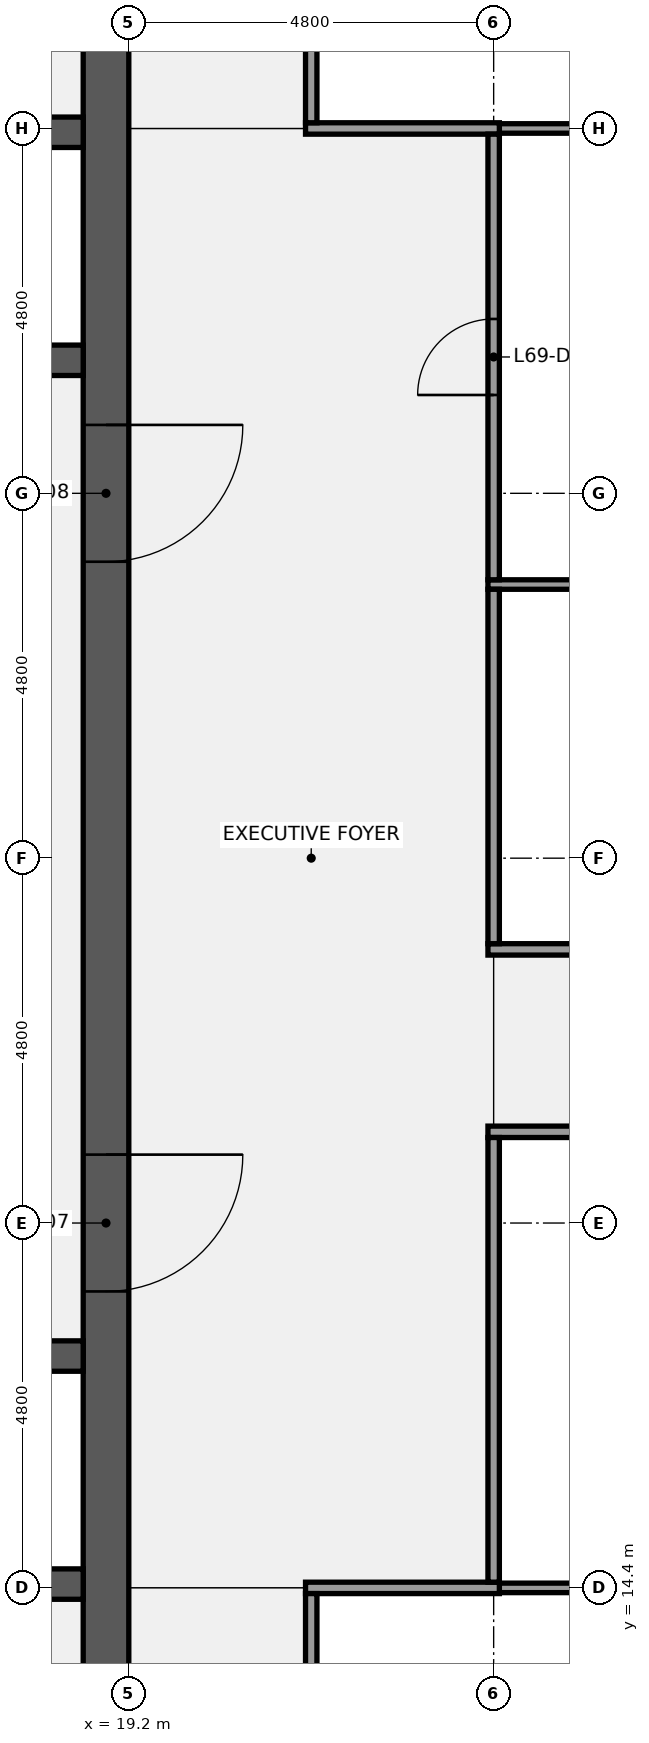
"""IFC4 building model, lengths in metres.
Left out: names, types, materials, properties, quantities, classifications, styles, units other than length and angle.
Written with IfcOpenShell. Run it as: python <this file> out.ifc"""

import sys

from ifc_helpers import new_model, si_unit, direction, frame, frame_2d, origin, place, context, subcontext, project, spatial, rectangle, extrude, element, fill, save


model = new_model("IFC4")
c1 = context("Model", 3, precision=1e-05, world=origin(), true_north=direction((0.0, 1.0)))
c2 = subcontext(c1, "Body", "Model", "MODEL_VIEW")
j1 = project(units=[si_unit("LENGTHUNIT", "METRE"), si_unit("PLANEANGLEUNIT", "RADIAN")], contexts=[c1])
p1 = place(None, origin())
s1 = spatial("IfcSite", under=j1, at=p1, CompositionType="ELEMENT")
p2 = place(p1, origin())
s2 = spatial("IfcBuilding", under=s1, at=p2, CompositionType="ELEMENT")
p3 = place(p2, frame((0.0, 0.0, 314.3)))
s3 = spatial("IfcBuildingStorey", under=s2, at=p3, CompositionType="ELEMENT", Elevation=314.3)
p4 = place(p3, frame((18.9, 38.4, 0.0), z_axis=(0.0, 0.0, 1.0), x_axis=(0.0, -1.0, 0.0)))
e1 = element("IfcWall", 1, at=p4, inside=s3, PredefinedType="SHEAR", context=c2, shape_type="SweptSolid", body=[
    extrude(rectangle(XDim=28.8, YDim=0.6, at=frame_2d((14.4, 0.0))), origin(), (0.0, 0.0, 1.0), 3.84),
])
p5 = place(p4, frame((18.3, 0.0, 0.0)))
e2 = element("IfcOpeningElement", 2, at=p5, cuts=e1, PredefinedType="OPENING", context=c2, shape_type="SweptSolid", body=[
    extrude(rectangle(XDim=1.8, YDim=2.1, at=frame_2d((0.9, 1.05))), frame((0.0, 0.31, 0.0), z_axis=(0.0, -1.0, 0.0), x_axis=(1.0, 0.0, 0.0)), (0.0, 0.0, 1.0), 0.62),
])
p6 = place(p4, frame((8.7, 0.0, 0.0)))
e3 = element("IfcOpeningElement", 3, at=p6, cuts=e1, PredefinedType="OPENING", context=c2, shape_type="SweptSolid", body=[
    extrude(rectangle(XDim=1.8, YDim=2.1, at=frame_2d((0.9, 1.05))), frame((0.0, 0.31, 0.0), z_axis=(0.0, -1.0, 0.0), x_axis=(1.0, 0.0, 0.0)), (0.0, 0.0, 1.0), 0.62),
])
p7 = place(p3, frame((0.6, 14.45, 0.0), z_axis=(0.0, 0.0, 1.0), x_axis=(1.0, 0.0, 0.0)))
e4 = element("IfcWall", 4, at=p7, inside=s3, PredefinedType="SHEAR", context=c2, shape_type="SweptSolid", body=[
    extrude(rectangle(XDim=18.0, YDim=0.4, at=frame_2d((9.0, 0.0))), origin(), (0.0, 0.0, 1.0), 3.84),
])
p8 = place(p3, frame((0.6, 17.45, 0.0), z_axis=(0.0, 0.0, 1.0), x_axis=(1.0, 0.0, 0.0)))
e5 = element("IfcWall", 5, at=p8, inside=s3, PredefinedType="SHEAR", context=c2, shape_type="SweptSolid", body=[
    extrude(rectangle(XDim=18.0, YDim=0.4, at=frame_2d((9.0, 0.0))), origin(), (0.0, 0.0, 1.0), 3.84),
])
p9 = place(p8, frame((2.163, 0.0, 0.0)))
e6 = element("IfcOpeningElement", 6, at=p9, cuts=e5, PredefinedType="OPENING", context=c2, shape_type="SweptSolid", body=[
    extrude(rectangle(XDim=1.0, YDim=2.1, at=frame_2d((0.5, 1.05))), frame((0.0, 0.21, 0.0), z_axis=(0.0, -1.0, 0.0), x_axis=(1.0, 0.0, 0.0)), (0.0, 0.0, 1.0), 0.42),
])
p10 = place(p8, frame((6.1, 0.0, 0.0)))
e7 = element("IfcOpeningElement", 7, at=p10, cuts=e5, PredefinedType="OPENING", context=c2, shape_type="SweptSolid", body=[
    extrude(rectangle(XDim=1.0, YDim=2.1, at=frame_2d((0.5, 1.05))), frame((0.0, 0.21, 0.0), z_axis=(0.0, -1.0, 0.0), x_axis=(1.0, 0.0, 0.0)), (0.0, 0.0, 1.0), 0.42),
])
p11 = place(p8, frame((8.5, 0.0, 0.0)))
e8 = element("IfcOpeningElement", 8, at=p11, cuts=e5, PredefinedType="OPENING", context=c2, shape_type="SweptSolid", body=[
    extrude(rectangle(XDim=1.0, YDim=2.1, at=frame_2d((0.5, 1.05))), frame((0.0, 0.21, 0.0), z_axis=(0.0, -1.0, 0.0), x_axis=(1.0, 0.0, 0.0)), (0.0, 0.0, 1.0), 0.42),
])
p12 = place(p8, frame((13.637, 0.0, 0.0)))
e9 = element("IfcOpeningElement", 9, at=p12, cuts=e5, PredefinedType="OPENING", context=c2, shape_type="SweptSolid", body=[
    extrude(rectangle(XDim=1.0, YDim=2.1, at=frame_2d((0.5, 1.05))), frame((0.0, 0.21, 0.0), z_axis=(0.0, -1.0, 0.0), x_axis=(1.0, 0.0, 0.0)), (0.0, 0.0, 1.0), 0.42),
])
p13 = place(p3, frame((0.6, 30.55, 0.0), z_axis=(0.0, 0.0, 1.0), x_axis=(1.0, 0.0, 0.0)))
e10 = element("IfcWall", 10, at=p13, inside=s3, PredefinedType="SHEAR", context=c2, shape_type="SweptSolid", body=[
    extrude(rectangle(XDim=18.0, YDim=0.4, at=frame_2d((9.0, 0.0))), origin(), (0.0, 0.0, 1.0), 3.84),
])
p14 = place(p13, frame((1.6, 0.0, 0.0)))
e11 = element("IfcOpeningElement", 11, at=p14, cuts=e10, PredefinedType="OPENING", context=c2, shape_type="SweptSolid", body=[
    extrude(rectangle(XDim=1.2, YDim=2.1, at=frame_2d((0.6, 1.05))), frame((0.0, 0.21, 0.0), z_axis=(0.0, -1.0, 0.0), x_axis=(1.0, 0.0, 0.0)), (0.0, 0.0, 1.0), 0.42),
])
p15 = place(p13, frame((4.2, 0.0, 0.0)))
e12 = element("IfcOpeningElement", 12, at=p15, cuts=e10, PredefinedType="OPENING", context=c2, shape_type="SweptSolid", body=[
    extrude(rectangle(XDim=1.2, YDim=2.1, at=frame_2d((0.6, 1.05))), frame((0.0, 0.21, 0.0), z_axis=(0.0, -1.0, 0.0), x_axis=(1.0, 0.0, 0.0)), (0.0, 0.0, 1.0), 0.42),
])
p16 = place(p13, frame((6.8, 0.0, 0.0)))
e13 = element("IfcOpeningElement", 13, at=p16, cuts=e10, PredefinedType="OPENING", context=c2, shape_type="SweptSolid", body=[
    extrude(rectangle(XDim=1.2, YDim=2.1, at=frame_2d((0.6, 1.05))), frame((0.0, 0.21, 0.0), z_axis=(0.0, -1.0, 0.0), x_axis=(1.0, 0.0, 0.0)), (0.0, 0.0, 1.0), 0.42),
])
p17 = place(p13, frame((10.0, 0.0, 0.0)))
e14 = element("IfcOpeningElement", 14, at=p17, cuts=e10, PredefinedType="OPENING", context=c2, shape_type="SweptSolid", body=[
    extrude(rectangle(XDim=1.2, YDim=2.1, at=frame_2d((0.6, 1.05))), frame((0.0, 0.21, 0.0), z_axis=(0.0, -1.0, 0.0), x_axis=(1.0, 0.0, 0.0)), (0.0, 0.0, 1.0), 0.42),
])
p18 = place(p13, frame((12.6, 0.0, 0.0)))
e15 = element("IfcOpeningElement", 15, at=p18, cuts=e10, PredefinedType="OPENING", context=c2, shape_type="SweptSolid", body=[
    extrude(rectangle(XDim=1.2, YDim=2.1, at=frame_2d((0.6, 1.05))), frame((0.0, 0.21, 0.0), z_axis=(0.0, -1.0, 0.0), x_axis=(1.0, 0.0, 0.0)), (0.0, 0.0, 1.0), 0.42),
])
p19 = place(p13, frame((15.2, 0.0, 0.0)))
e16 = element("IfcOpeningElement", 16, at=p19, cuts=e10, PredefinedType="OPENING", context=c2, shape_type="SweptSolid", body=[
    extrude(rectangle(XDim=1.2, YDim=2.1, at=frame_2d((0.6, 1.05))), frame((0.0, 0.21, 0.0), z_axis=(0.0, -1.0, 0.0), x_axis=(1.0, 0.0, 0.0)), (0.0, 0.0, 1.0), 0.42),
])
p20 = place(p3, frame((0.6, 33.55, 0.0), z_axis=(0.0, 0.0, 1.0), x_axis=(1.0, 0.0, 0.0)))
e17 = element("IfcWall", 17, at=p20, inside=s3, PredefinedType="SHEAR", context=c2, shape_type="SweptSolid", body=[
    extrude(rectangle(XDim=18.0, YDim=0.4, at=frame_2d((9.0, 0.0))), origin(), (0.0, 0.0, 1.0), 3.84),
])
p21 = place(p3, frame((24.075, 14.4, 0.0), z_axis=(0.0, 0.0, 1.0), x_axis=(1.0, 0.0, 0.0)))
e18 = element("IfcWall", 18, at=p21, inside=s3, PredefinedType="PARTITIONING", context=c2, shape_type="SweptSolid", body=[
    extrude(rectangle(XDim=9.6, YDim=0.125, at=frame_2d((4.8, 0.0))), origin(), (0.0, 0.0, 1.0), 2.87),
])
p22 = place(p3, frame((21.525, 14.4, 0.0), z_axis=(0.0, 0.0, 1.0), x_axis=(1.0, 0.0, 0.0)))
e19 = element("IfcWall", 19, at=p22, inside=s3, PredefinedType="PARTITIONING", context=c2, shape_type="SweptSolid", body=[
    extrude(rectangle(XDim=2.55, YDim=0.15, at=frame_2d((1.275, 0.0))), origin(), (0.0, 0.0, 1.0), 2.87),
])
p23 = place(p3, frame((23.925, 20.4, 0.0), z_axis=(0.0, 0.0, 1.0), x_axis=(1.0, 0.0, 0.0)))
e20 = element("IfcWall", 20, at=p23, inside=s3, PredefinedType="PARTITIONING", context=c2, shape_type="SweptSolid", body=[
    extrude(rectangle(XDim=9.75, YDim=0.15, at=frame_2d((4.875, 0.0))), origin(), (0.0, 0.0, 1.0), 2.87),
])
p24 = place(p23, frame((4.375, 0.0, 0.0)))
e21 = element("IfcOpeningElement", 21, at=p24, cuts=e20, PredefinedType="OPENING", context=c2, shape_type="SweptSolid", body=[
    extrude(rectangle(XDim=1.0, YDim=2.1, at=frame_2d((0.5, 1.05))), frame((0.0, 0.085, 0.0), z_axis=(0.0, -1.0, 0.0), x_axis=(1.0, 0.0, 0.0)), (0.0, 0.0, 1.0), 0.17),
])
p25 = place(p3, frame((23.925, 22.8, 0.0), z_axis=(0.0, 0.0, 1.0), x_axis=(1.0, 0.0, 0.0)))
e22 = element("IfcWall", 22, at=p25, inside=s3, PredefinedType="PARTITIONING", context=c2, shape_type="SweptSolid", body=[
    extrude(rectangle(XDim=9.75, YDim=0.15, at=frame_2d((4.875, 0.0))), origin(), (0.0, 0.0, 1.0), 2.87),
])
p26 = place(p25, frame((4.375, 0.0, 0.0)))
e23 = element("IfcOpeningElement", 23, at=p26, cuts=e22, PredefinedType="OPENING", context=c2, shape_type="SweptSolid", body=[
    extrude(rectangle(XDim=1.0, YDim=2.1, at=frame_2d((0.5, 1.05))), frame((0.0, 0.085, 0.0), z_axis=(0.0, -1.0, 0.0), x_axis=(1.0, 0.0, 0.0)), (0.0, 0.0, 1.0), 0.17),
])
p27 = place(p3, frame((23.925, 27.6, 0.0), z_axis=(0.0, 0.0, 1.0), x_axis=(1.0, 0.0, 0.0)))
e24 = element("IfcWall", 24, at=p27, inside=s3, PredefinedType="PARTITIONING", context=c2, shape_type="SweptSolid", body=[
    extrude(rectangle(XDim=9.75, YDim=0.125, at=frame_2d((4.875, 0.0))), origin(), (0.0, 0.0, 1.0), 2.87),
])
p28 = place(p3, frame((24.075, 33.6, 0.0), z_axis=(0.0, 0.0, 1.0), x_axis=(1.0, 0.0, 0.0)))
e25 = element("IfcWall", 25, at=p28, inside=s3, PredefinedType="PARTITIONING", context=c2, shape_type="SweptSolid", body=[
    extrude(rectangle(XDim=9.6, YDim=0.125, at=frame_2d((4.8, 0.0))), origin(), (0.0, 0.0, 1.0), 2.87),
])
p29 = place(p3, frame((21.525, 33.6, 0.0), z_axis=(0.0, 0.0, 1.0), x_axis=(1.0, 0.0, 0.0)))
e26 = element("IfcWall", 26, at=p29, inside=s3, PredefinedType="PARTITIONING", context=c2, shape_type="SweptSolid", body=[
    extrude(rectangle(XDim=2.55, YDim=0.15, at=frame_2d((1.275, 0.0))), origin(), (0.0, 0.0, 1.0), 2.87),
])
for number, where, z_axis, x_axis in (
    (27, (21.6, 9.675, 0.0), (0.0, 0.0, 1.0), (0.0, 1.0, 0.0)),
    (28, (21.6, 33.675, 0.0), (0.0, 0.0, 1.0), (0.0, 1.0, 0.0)),
):
    element("IfcWall", number, at=place(p3, frame(where, z_axis=z_axis, x_axis=x_axis)), inside=s3, PredefinedType="PARTITIONING", context=c2, shape_type="SweptSolid", body=[
        extrude(rectangle(XDim=4.65, YDim=0.15, at=frame_2d((2.325, 0.0))), origin(), (0.0, 0.0, 1.0), 2.87),
    ])
p30 = place(p3, frame((24.0, 14.475, 0.0), z_axis=(0.0, 0.0, 1.0), x_axis=(0.0, 1.0, 0.0)))
e29 = element("IfcWall", 29, at=p30, inside=s3, PredefinedType="PARTITIONING", context=c2, shape_type="SweptSolid", body=[
    extrude(rectangle(XDim=5.85, YDim=0.15, at=frame_2d((2.925, 0.0))), origin(), (0.0, 0.0, 1.0), 2.87),
])
p31 = place(p3, frame((24.0, 22.875, 0.0), z_axis=(0.0, 0.0, 1.0), x_axis=(0.0, 1.0, 0.0)))
e30 = element("IfcWall", 30, at=p31, inside=s3, PredefinedType="PARTITIONING", context=c2, shape_type="SweptSolid", body=[
    extrude(rectangle(XDim=4.663, YDim=0.15, at=frame_2d((2.331, 0.0))), origin(), (0.0, 0.0, 1.0), 2.87),
])
p32 = place(p3, frame((24.0, 27.663, 0.0), z_axis=(0.0, 0.0, 1.0), x_axis=(0.0, 1.0, 0.0)))
e31 = element("IfcWall", 31, at=p32, inside=s3, PredefinedType="PARTITIONING", context=c2, shape_type="SweptSolid", body=[
    extrude(rectangle(XDim=5.862, YDim=0.15, at=frame_2d((2.931, 0.0))), origin(), (0.0, 0.0, 1.0), 2.87),
])
p33 = place(p32, frame((2.431, 0.0, 0.0)))
e32 = element("IfcOpeningElement", 32, at=p33, cuts=e31, PredefinedType="OPENING", context=c2, shape_type="SweptSolid", body=[
    extrude(rectangle(XDim=1.0, YDim=2.1, at=frame_2d((0.5, 1.05))), frame((0.0, 0.085, 0.0), z_axis=(0.0, -1.0, 0.0), x_axis=(1.0, 0.0, 0.0)), (0.0, 0.0, 1.0), 0.17),
])
p34 = place(p5, origin())
e33 = element("IfcDoor", 33, at=p34, inside=s3, OperationType="DOUBLE_DOOR_SINGLE_SWING", PredefinedType="DOOR", context=c2, shape_type="SweptSolid", body=[
    extrude(rectangle(XDim=1.8, YDim=2.1, at=frame_2d((0.9, 1.05))), frame((0.0, 0.025, 0.0), z_axis=(0.0, -1.0, 0.0), x_axis=(1.0, 0.0, 0.0)), (0.0, 0.0, 1.0), 0.05),
])
fill(e2, e33)
p35 = place(p6, origin())
e34 = element("IfcDoor", 34, at=p35, inside=s3, OperationType="DOUBLE_DOOR_SINGLE_SWING", PredefinedType="DOOR", context=c2, shape_type="SweptSolid", body=[
    extrude(rectangle(XDim=1.8, YDim=2.1, at=frame_2d((0.9, 1.05))), frame((0.0, 0.025, 0.0), z_axis=(0.0, -1.0, 0.0), x_axis=(1.0, 0.0, 0.0)), (0.0, 0.0, 1.0), 0.05),
])
fill(e3, e34)
p36 = place(p33, origin())
e35 = element("IfcDoor", 35, at=p36, inside=s3, OperationType="SINGLE_SWING_LEFT", PredefinedType="DOOR", context=c2, shape_type="SweptSolid", body=[
    extrude(rectangle(XDim=1.0, YDim=2.1, at=frame_2d((0.5, 1.05))), frame((0.0, 0.025, 0.0), z_axis=(0.0, -1.0, 0.0), x_axis=(1.0, 0.0, 0.0)), (0.0, 0.0, 1.0), 0.05),
])
fill(e32, e35)
save(model, sys.argv[1])
